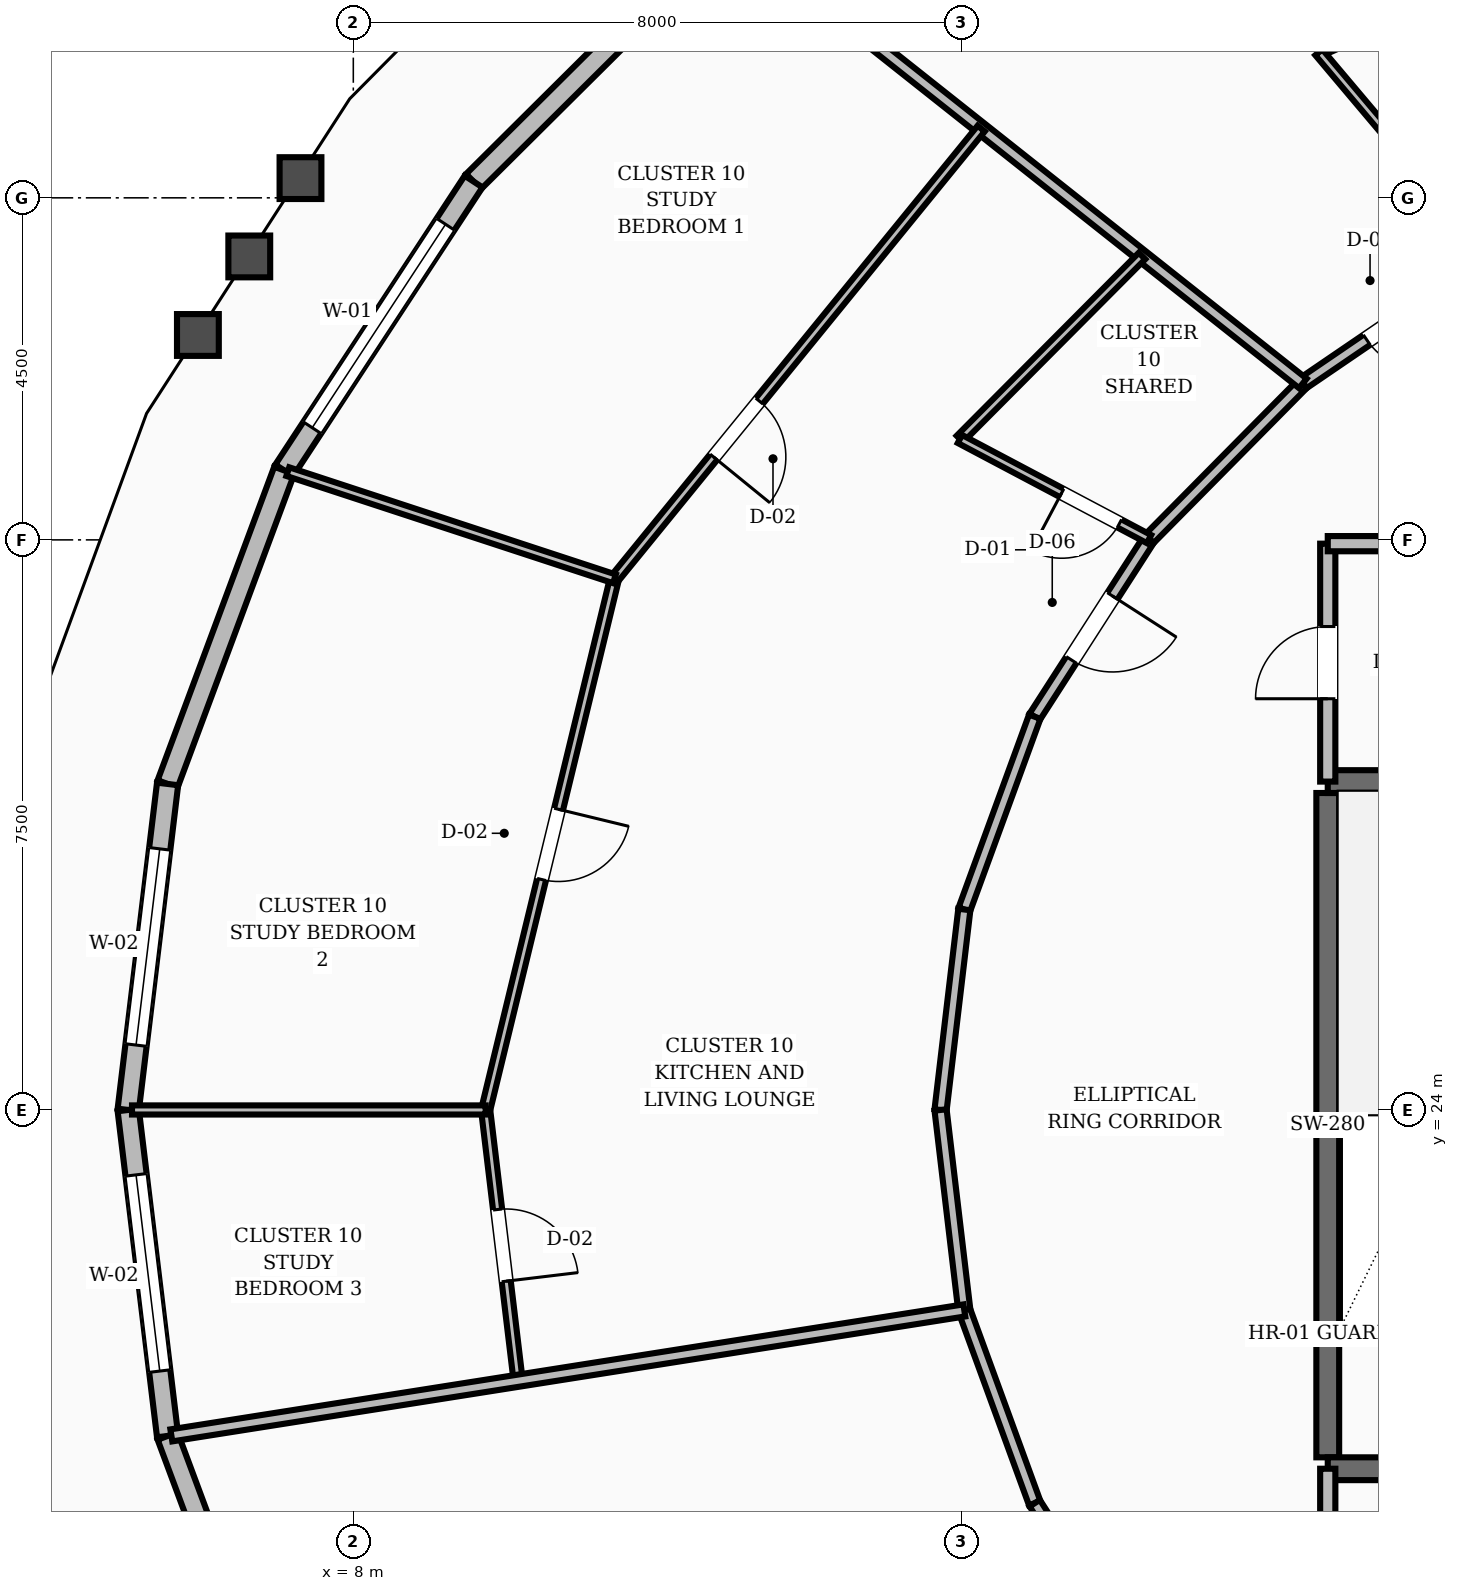
"""IFC4 building model, lengths in metres.
Left out: names, types, materials, properties, quantities, classifications, styles, units other than length and angle.
Written with IfcOpenShell. Run it as: python <this file> out.ifc"""

import sys

from ifc_helpers import new_model, si_unit, direction, frame, frame_2d, origin, place, context, subcontext, project, spatial, rectangle, extrude, element, fill, save


model = new_model("IFC4")
c1 = context("Model", 3, precision=1e-05, world=origin(), true_north=direction((0.0, 1.0)))
c2 = subcontext(c1, "Body", "Model", "MODEL_VIEW")
j1 = project(units=[si_unit("LENGTHUNIT", "METRE"), si_unit("PLANEANGLEUNIT", "RADIAN")], contexts=[c1])
p1 = place(None, origin())
s1 = spatial("IfcSite", under=j1, at=p1, CompositionType="ELEMENT")
p2 = place(p1, origin())
s2 = spatial("IfcBuilding", under=s1, at=p2, CompositionType="ELEMENT")
p3 = place(p2, frame((0.0, 0.0, 91.6)))
s3 = spatial("IfcBuildingStorey", under=s2, at=p3, CompositionType="ELEMENT", Elevation=91.6)
p4 = place(p3, frame((20.82, 19.43, 0.0), z_axis=(0.0, 0.0, 1.0), x_axis=(0.0, 1.0, 0.0)))
e1 = element("IfcWall", 1, at=p4, inside=s3, PredefinedType="SHEAR", context=c2, shape_type="SweptSolid", body=[
    extrude(rectangle(XDim=8.74, YDim=0.3, at=frame_2d((4.37, 0.0))), origin(), (0.0, 0.0, 1.0), 3.6),
])
p5 = place(p3, frame((20.82, 19.28, 0.0), z_axis=(0.0, 0.0, 1.0), x_axis=(1.0, 0.0, 0.0)))
e2 = element("IfcWall", 2, at=p5, inside=s3, PredefinedType="SHEAR", context=c2, shape_type="SweptSolid", body=[
    extrude(rectangle(XDim=3.6, YDim=0.3, at=frame_2d((1.8, 0.0))), origin(), (0.0, 0.0, 1.0), 3.6),
])
p6 = place(p5, frame((1.3, 0.0, 0.0)))
e3 = element("IfcOpeningElement", 3, at=p6, cuts=e2, PredefinedType="OPENING", context=c2, shape_type="SweptSolid", body=[
    extrude(rectangle(XDim=1.1, YDim=2.1, at=frame_2d((0.55, 1.05))), frame((0.0, 0.16, 0.0), z_axis=(0.0, -1.0, 0.0), x_axis=(1.0, 0.0, 0.0)), (0.0, 0.0, 1.0), 0.32),
])
p7 = place(p3, frame((20.82, 28.32, 0.0), z_axis=(0.0, 0.0, 1.0), x_axis=(1.0, 0.0, 0.0)))
e4 = element("IfcWall", 4, at=p7, inside=s3, PredefinedType="SHEAR", context=c2, shape_type="SweptSolid", body=[
    extrude(rectangle(XDim=3.6, YDim=0.3, at=frame_2d((1.8, 0.0))), origin(), (0.0, 0.0, 1.0), 3.6),
])
p8 = place(p3, frame((12.935, 39.546, 0.0), z_axis=(0.0, 0.0, 1.0), x_axis=(-0.709375776042, -0.704830482006, 0.0)))
e5 = element("IfcWall", 5, at=p8, inside=s3, PredefinedType="STANDARD", context=c2, shape_type="SweptSolid", body=[
    extrude(rectangle(XDim=4.727, YDim=0.28, at=frame_2d((2.363, 0.0))), origin(), (0.0, 0.0, 1.0), 2.71),
])
p9 = place(p3, frame((9.582, 36.214, 0.0), z_axis=(0.0, 0.0, 1.0), x_axis=(-0.548224545432, -0.836331183076, 0.0)))
e6 = element("IfcWall", 6, at=p9, inside=s3, PredefinedType="STANDARD", context=c2, shape_type="SweptSolid", body=[
    extrude(rectangle(XDim=4.545, YDim=0.28, at=frame_2d((2.272, 0.0))), origin(), (0.0, 0.0, 1.0), 2.71),
])
p10 = place(p9, frame((0.672, 0.0, 0.8)))
e7 = element("IfcOpeningElement", 7, at=p10, cuts=e6, PredefinedType="OPENING", context=c2, shape_type="SweptSolid", body=[
    extrude(rectangle(XDim=3.2, YDim=1.65, at=frame_2d((1.6, 0.825))), frame((0.0, 0.15, 0.0), z_axis=(0.0, -1.0, 0.0), x_axis=(1.0, 0.0, 0.0)), (0.0, 0.0, 1.0), 0.3),
])
p11 = place(p3, frame((7.091, 32.413, 0.0), z_axis=(0.0, 0.0, 1.0), x_axis=(-0.348647575397, -0.937253897388, 0.0)))
e8 = element("IfcWall", 8, at=p11, inside=s3, PredefinedType="STANDARD", context=c2, shape_type="SweptSolid", body=[
    extrude(rectangle(XDim=4.4, YDim=0.28, at=frame_2d((2.2, 0.0))), origin(), (0.0, 0.0, 1.0), 2.71),
])
p12 = place(p3, frame((5.557, 28.289, 0.0), z_axis=(0.0, 0.0, 1.0), x_axis=(-0.11991619344, -0.992784018078, 0.0)))
e9 = element("IfcWall", 9, at=p12, inside=s3, PredefinedType="STANDARD", context=c2, shape_type="SweptSolid", body=[
    extrude(rectangle(XDim=4.32, YDim=0.28, at=frame_2d((2.16, 0.0))), origin(), (0.0, 0.0, 1.0), 2.71),
])
p13 = place(p12, frame((0.86, 0.0, 0.8)))
e10 = element("IfcOpeningElement", 10, at=p13, cuts=e9, PredefinedType="OPENING", context=c2, shape_type="SweptSolid", body=[
    extrude(rectangle(XDim=2.6, YDim=1.65, at=frame_2d((1.3, 0.825))), frame((0.0, 0.15, 0.0), z_axis=(0.0, -1.0, 0.0), x_axis=(1.0, 0.0, 0.0)), (0.0, 0.0, 1.0), 0.3),
])
p14 = place(p3, frame((5.039, 24.0, 0.0), z_axis=(0.0, 0.0, 1.0), x_axis=(0.11991619344, -0.992784018078, 0.0)))
e11 = element("IfcWall", 11, at=p14, inside=s3, PredefinedType="STANDARD", context=c2, shape_type="SweptSolid", body=[
    extrude(rectangle(XDim=4.32, YDim=0.28, at=frame_2d((2.16, 0.0))), origin(), (0.0, 0.0, 1.0), 2.71),
])
p15 = place(p14, frame((0.86, 0.0, 0.8)))
e12 = element("IfcOpeningElement", 12, at=p15, cuts=e11, PredefinedType="OPENING", context=c2, shape_type="SweptSolid", body=[
    extrude(rectangle(XDim=2.6, YDim=1.65, at=frame_2d((1.3, 0.825))), frame((0.0, 0.15, 0.0), z_axis=(0.0, -1.0, 0.0), x_axis=(1.0, 0.0, 0.0)), (0.0, 0.0, 1.0), 0.3),
])
p16 = place(p3, frame((5.557, 19.711, 0.0), z_axis=(0.0, 0.0, 1.0), x_axis=(0.348647575397, -0.937253897388, 0.0)))
e13 = element("IfcWall", 13, at=p16, inside=s3, PredefinedType="STANDARD", context=c2, shape_type="SweptSolid", body=[
    extrude(rectangle(XDim=4.4, YDim=0.28, at=frame_2d((2.2, 0.0))), origin(), (0.0, 0.0, 1.0), 2.71),
])
p17 = place(p3, frame((20.82, 16.55, 0.0), z_axis=(0.0, 0.0, 1.0), x_axis=(0.0, 1.0, 0.0)))
e14 = element("IfcWall", 14, at=p17, inside=s3, PredefinedType="SOLIDWALL", context=c2, shape_type="SweptSolid", body=[
    extrude(rectangle(XDim=2.73, YDim=0.2, at=frame_2d((1.365, 0.0))), origin(), (0.0, 0.0, 1.0), 2.71),
])
p18 = place(p17, frame((0.815, 0.0, 0.0)))
e15 = element("IfcOpeningElement", 15, at=p18, cuts=e14, PredefinedType="OPENING", context=c2, shape_type="SweptSolid", body=[
    extrude(rectangle(XDim=1.1, YDim=2.1, at=frame_2d((0.55, 1.05))), frame((0.0, 0.11, 0.0), z_axis=(0.0, -1.0, 0.0), x_axis=(1.0, 0.0, 0.0)), (0.0, 0.0, 1.0), 0.22),
])
p19 = place(p3, frame((20.82, 28.32, 0.0), z_axis=(0.0, 0.0, 1.0), x_axis=(0.0, 1.0, 0.0)))
e16 = element("IfcWall", 16, at=p19, inside=s3, PredefinedType="SOLIDWALL", context=c2, shape_type="SweptSolid", body=[
    extrude(rectangle(XDim=3.13, YDim=0.2, at=frame_2d((1.565, 0.0))), origin(), (0.0, 0.0, 1.0), 2.71),
])
p20 = place(p19, frame((1.09, 0.0, 0.0)))
e17 = element("IfcOpeningElement", 17, at=p20, cuts=e16, PredefinedType="OPENING", context=c2, shape_type="SweptSolid", body=[
    extrude(rectangle(XDim=0.95, YDim=2.1, at=frame_2d((0.475, 1.05))), frame((0.0, 0.11, 0.0), z_axis=(0.0, -1.0, 0.0), x_axis=(1.0, 0.0, 0.0)), (0.0, 0.0, 1.0), 0.22),
])
p21 = place(p3, frame((20.82, 31.45, 0.0), z_axis=(0.0, 0.0, 1.0), x_axis=(1.0, 0.0, 0.0)))
e18 = element("IfcWall", 18, at=p21, inside=s3, PredefinedType="SOLIDWALL", context=c2, shape_type="SweptSolid", body=[
    extrude(rectangle(XDim=3.98, YDim=0.2, at=frame_2d((1.99, 0.0))), origin(), (0.0, 0.0, 1.0), 2.71),
])
p22 = place(p3, frame((22.959, 35.24, 0.0), z_axis=(0.0, 0.0, 1.0), x_axis=(-0.826293096206, -0.56324037423, 0.0)))
e19 = element("IfcWall", 19, at=p22, inside=s3, PredefinedType="SOLIDWALL", context=c2, shape_type="SweptSolid", body=[
    extrude(rectangle(XDim=2.985, YDim=0.16, at=frame_2d((1.492, 0.0))), origin(), (0.0, 0.0, 1.0), 2.71),
])
p23 = place(p22, frame((1.017, 0.0, 0.0)))
e20 = element("IfcOpeningElement", 20, at=p23, cuts=e19, PredefinedType="OPENING", context=c2, shape_type="SweptSolid", body=[
    extrude(rectangle(XDim=0.95, YDim=2.1, at=frame_2d((0.475, 1.05))), frame((0.0, 0.09, 0.0), z_axis=(0.0, -1.0, 0.0), x_axis=(1.0, 0.0, 0.0)), (0.0, 0.0, 1.0), 0.18),
])
p24 = place(p3, frame((20.492, 33.559, 0.0), z_axis=(0.0, 0.0, 1.0), x_axis=(-0.702811997, -0.711375636969, 0.0)))
e21 = element("IfcWall", 21, at=p24, inside=s3, PredefinedType="SOLIDWALL", context=c2, shape_type="SweptSolid", body=[
    extrude(rectangle(XDim=2.879, YDim=0.16, at=frame_2d((1.44, 0.0))), origin(), (0.0, 0.0, 1.0), 2.71),
])
p25 = place(p3, frame((18.469, 31.51, 0.0), z_axis=(0.0, 0.0, 1.0), x_axis=(-0.541126045017, -0.840941498206, 0.0)))
e22 = element("IfcWall", 22, at=p25, inside=s3, PredefinedType="SOLIDWALL", context=c2, shape_type="SweptSolid", body=[
    extrude(rectangle(XDim=2.779, YDim=0.16, at=frame_2d((1.39, 0.0))), origin(), (0.0, 0.0, 1.0), 2.71),
])
p26 = place(p25, frame((0.89, 0.0, 0.0)))
e23 = element("IfcOpeningElement", 23, at=p26, cuts=e22, PredefinedType="OPENING", context=c2, shape_type="SweptSolid", body=[
    extrude(rectangle(XDim=1.0, YDim=2.1, at=frame_2d((0.5, 1.05))), frame((0.0, 0.09, 0.0), z_axis=(0.0, -1.0, 0.0), x_axis=(1.0, 0.0, 0.0)), (0.0, 0.0, 1.0), 0.18),
])
p27 = place(p3, frame((16.965, 29.173, 0.0), z_axis=(0.0, 0.0, 1.0), x_axis=(-0.343013437329, -0.939330496583, 0.0)))
e24 = element("IfcWall", 24, at=p27, inside=s3, PredefinedType="SOLIDWALL", context=c2, shape_type="SweptSolid", body=[
    extrude(rectangle(XDim=2.7, YDim=0.16, at=frame_2d((1.35, 0.0))), origin(), (0.0, 0.0, 1.0), 2.71),
])
for number, where, z_axis, x_axis in (
    (25, (16.039, 26.637, 0.0), (0.0, 0.0, 1.0), (-0.118, -0.993, 0.0)),
    (26, (15.726, 24.0, 0.0), (0.0, 0.0, 1.0), (0.118, -0.993, 0.0)),
):
    element("IfcWall", number, at=place(p3, frame(where, z_axis=z_axis, x_axis=x_axis)), inside=s3, PredefinedType="SOLIDWALL", context=c2, shape_type="SweptSolid", body=[
        extrude(rectangle(XDim=2.656, YDim=0.16, at=frame_2d((1.328, 0.0))), origin(), (0.0, 0.0, 1.0), 2.71),
    ])
p28 = place(p3, frame((16.039, 21.363, 0.0), z_axis=(0.0, 0.0, 1.0), x_axis=(0.343013437329, -0.939330496583, 0.0)))
e27 = element("IfcWall", 27, at=p28, inside=s3, PredefinedType="SOLIDWALL", context=c2, shape_type="SweptSolid", body=[
    extrude(rectangle(XDim=2.7, YDim=0.16, at=frame_2d((1.35, 0.0))), origin(), (0.0, 0.0, 1.0), 2.71),
])
p29 = place(p3, frame((16.965, 18.827, 0.0), z_axis=(0.0, 0.0, 1.0), x_axis=(0.541126045017, -0.840941498206, 0.0)))
e28 = element("IfcWall", 28, at=p29, inside=s3, PredefinedType="SOLIDWALL", context=c2, shape_type="SweptSolid", body=[
    extrude(rectangle(XDim=2.779, YDim=0.16, at=frame_2d((1.39, 0.0))), origin(), (0.0, 0.0, 1.0), 2.71),
])
p30 = place(p29, frame((0.89, 0.0, 0.0)))
e29 = element("IfcOpeningElement", 29, at=p30, cuts=e28, PredefinedType="OPENING", context=c2, shape_type="SweptSolid", body=[
    extrude(rectangle(XDim=1.0, YDim=2.1, at=frame_2d((0.5, 1.05))), frame((0.0, 0.09, 0.0), z_axis=(0.0, -1.0, 0.0), x_axis=(1.0, 0.0, 0.0)), (0.0, 0.0, 1.0), 0.18),
])
p31 = place(p3, frame((24.218, 39.462, 0.0), z_axis=(0.0, 0.0, 1.0), x_axis=(-0.915338463075, -0.402685358582, 0.0)))
e30 = element("IfcWall", 30, at=p31, inside=s3, PredefinedType="PARTITIONING", context=c2, shape_type="SweptSolid", body=[
    extrude(rectangle(XDim=3.841, YDim=0.12, at=frame_2d((1.92, 0.0))), origin(), (0.0, 0.0, 1.0), 2.71),
])
p32 = place(p31, frame((1.49, 0.0, 0.0)))
e31 = element("IfcOpeningElement", 31, at=p32, cuts=e30, PredefinedType="OPENING", context=c2, shape_type="SweptSolid", body=[
    extrude(rectangle(XDim=0.86, YDim=2.1, at=frame_2d((0.43, 1.05))), frame((0.0, 0.07, 0.0), z_axis=(0.0, -1.0, 0.0), x_axis=(1.0, 0.0, 0.0)), (0.0, 0.0, 1.0), 0.14),
])
p33 = place(p3, frame((22.959, 35.24, 0.0), z_axis=(0.0, 0.0, 1.0), x_axis=(-0.644715569152, 0.764422549964, 0.0)))
e32 = element("IfcWall", 32, at=p33, inside=s3, PredefinedType="PARTITIONING", context=c2, shape_type="SweptSolid", body=[
    extrude(rectangle(XDim=3.5, YDim=0.12, at=frame_2d((1.75, 0.0))), origin(), (0.0, 0.0, 1.0), 2.71),
])
p34 = place(p3, frame((20.492, 33.559, 0.0), z_axis=(0.0, 0.0, 1.0), x_axis=(-0.783820213827, 0.620987819846, 0.0)))
e33 = element("IfcWall", 33, at=p34, inside=s3, PredefinedType="SOLIDWALL", context=c2, shape_type="SweptSolid", body=[
    extrude(rectangle(XDim=9.591, YDim=0.16, at=frame_2d((4.796, 0.0))), origin(), (0.0, 0.0, 1.0), 2.71),
])
p35 = place(p3, frame((18.376, 35.235, 0.0), z_axis=(0.0, 0.0, 1.0), x_axis=(-0.705379680945, -0.708829673271, 0.0)))
e34 = element("IfcWall", 34, at=p35, inside=s3, PredefinedType="PARTITIONING", context=c2, shape_type="SweptSolid", body=[
    extrude(rectangle(XDim=3.397, YDim=0.12, at=frame_2d((1.698, 0.0))), origin(), (0.0, 0.0, 1.0), 2.71),
])
p36 = place(p3, frame((18.469, 31.51, 0.0), z_axis=(0.0, 0.0, 1.0), x_axis=(-0.883815336017, 0.467835924039, 0.0)))
e35 = element("IfcWall", 35, at=p36, inside=s3, PredefinedType="PARTITIONING", context=c2, shape_type="SweptSolid", body=[
    extrude(rectangle(XDim=2.815, YDim=0.12, at=frame_2d((1.408, 0.0))), origin(), (0.0, 0.0, 1.0), 2.71),
])
p37 = place(p36, frame((0.44, 0.0, 0.0)))
e36 = element("IfcOpeningElement", 36, at=p37, cuts=e35, PredefinedType="OPENING", context=c2, shape_type="SweptSolid", body=[
    extrude(rectangle(XDim=0.86, YDim=2.1, at=frame_2d((0.43, 1.05))), frame((0.0, 0.07, 0.0), z_axis=(0.0, -1.0, 0.0), x_axis=(1.0, 0.0, 0.0)), (0.0, 0.0, 1.0), 0.14),
])
p38 = place(p3, frame((16.26, 36.911, 0.0), z_axis=(0.0, 0.0, 1.0), x_axis=(-0.631544914576, -0.775339294034, 0.0)))
e37 = element("IfcWall", 37, at=p38, inside=s3, PredefinedType="PARTITIONING", context=c2, shape_type="SweptSolid", body=[
    extrude(rectangle(XDim=7.64, YDim=0.12, at=frame_2d((3.82, 0.0))), origin(), (0.0, 0.0, 1.0), 2.71),
])
p39 = place(p38, frame((4.623, 0.0, 0.0)))
e38 = element("IfcOpeningElement", 38, at=p39, cuts=e37, PredefinedType="OPENING", context=c2, shape_type="SweptSolid", body=[
    extrude(rectangle(XDim=0.95, YDim=2.1, at=frame_2d((0.475, 1.05))), frame((0.0, 0.07, 0.0), z_axis=(0.0, -1.0, 0.0), x_axis=(1.0, 0.0, 0.0)), (0.0, 0.0, 1.0), 0.14),
])
p40 = place(p3, frame((11.435, 30.988, 0.0), z_axis=(0.0, 0.0, 1.0), x_axis=(-0.235650560851, -0.971837853333, 0.0)))
e39 = element("IfcWall", 39, at=p40, inside=s3, PredefinedType="PARTITIONING", context=c2, shape_type="SweptSolid", body=[
    extrude(rectangle(XDim=7.19, YDim=0.12, at=frame_2d((3.595, 0.0))), origin(), (0.0, 0.0, 1.0), 2.71),
])
p41 = place(p40, frame((3.12, 0.0, 0.0)))
e40 = element("IfcOpeningElement", 40, at=p41, cuts=e39, PredefinedType="OPENING", context=c2, shape_type="SweptSolid", body=[
    extrude(rectangle(XDim=0.95, YDim=2.1, at=frame_2d((0.475, 1.05))), frame((0.0, 0.07, 0.0), z_axis=(0.0, -1.0, 0.0), x_axis=(1.0, 0.0, 0.0)), (0.0, 0.0, 1.0), 0.14),
])
p42 = place(p3, frame((11.435, 30.988, 0.0), z_axis=(0.0, 0.0, 1.0), x_axis=(-0.950146719348, 0.311803161806, 0.0)))
e41 = element("IfcWall", 41, at=p42, inside=s3, PredefinedType="PARTITIONING", context=c2, shape_type="SweptSolid", body=[
    extrude(rectangle(XDim=4.523, YDim=0.12, at=frame_2d((2.261, 0.0))), origin(), (0.0, 0.0, 1.0), 2.71),
])
p43 = place(p3, frame((9.741, 24.0, 0.0), z_axis=(0.0, 0.0, 1.0), x_axis=(0.119217667406, -0.992868142191, 0.0)))
e42 = element("IfcWall", 42, at=p43, inside=s3, PredefinedType="PARTITIONING", context=c2, shape_type="SweptSolid", body=[
    extrude(rectangle(XDim=3.588, YDim=0.12, at=frame_2d((1.794, 0.0))), origin(), (0.0, 0.0, 1.0), 2.71),
])
p44 = place(p43, frame((1.319, 0.0, 0.0)))
e43 = element("IfcOpeningElement", 43, at=p44, cuts=e42, PredefinedType="OPENING", context=c2, shape_type="SweptSolid", body=[
    extrude(rectangle(XDim=0.95, YDim=2.1, at=frame_2d((0.475, 1.05))), frame((0.0, 0.07, 0.0), z_axis=(0.0, -1.0, 0.0), x_axis=(1.0, 0.0, 0.0)), (0.0, 0.0, 1.0), 0.14),
])
p45 = place(p3, frame((9.741, 24.0, 0.0), z_axis=(0.0, 0.0, 1.0), x_axis=(-1.0, 0.0, 0.0)))
e44 = element("IfcWall", 44, at=p45, inside=s3, PredefinedType="PARTITIONING", context=c2, shape_type="SweptSolid", body=[
    extrude(rectangle(XDim=4.653, YDim=0.12, at=frame_2d((2.326, 0.0))), origin(), (0.0, 0.0, 1.0), 2.71),
])
p46 = place(p3, frame((16.039, 21.363, 0.0), z_axis=(0.0, 0.0, 1.0), x_axis=(-0.987810338439, -0.155662247421, 0.0)))
e45 = element("IfcWall", 45, at=p46, inside=s3, PredefinedType="SOLIDWALL", context=c2, shape_type="SweptSolid", body=[
    extrude(rectangle(XDim=10.562, YDim=0.16, at=frame_2d((5.281, 0.0))), origin(), (0.0, 0.0, 1.0), 2.71),
])
p47 = place(p10, origin())
e46 = element("IfcWindow", 46, at=p47, inside=s3, PartitioningType="SINGLE_PANEL", PredefinedType="WINDOW", context=c2, shape_type="SweptSolid", body=[
    extrude(rectangle(XDim=3.2, YDim=1.65, at=frame_2d((1.6, 0.825))), frame((0.0, 0.03, 0.0), z_axis=(0.0, -1.0, 0.0), x_axis=(1.0, 0.0, 0.0)), (0.0, 0.0, 1.0), 0.06),
])
fill(e7, e46)
p48 = place(p13, origin())
e47 = element("IfcWindow", 47, at=p48, inside=s3, PartitioningType="SINGLE_PANEL", PredefinedType="WINDOW", context=c2, shape_type="SweptSolid", body=[
    extrude(rectangle(XDim=2.6, YDim=1.65, at=frame_2d((1.3, 0.825))), frame((0.0, 0.03, 0.0), z_axis=(0.0, -1.0, 0.0), x_axis=(1.0, 0.0, 0.0)), (0.0, 0.0, 1.0), 0.06),
])
fill(e10, e47)
p49 = place(p15, origin())
e48 = element("IfcWindow", 48, at=p49, inside=s3, PartitioningType="SINGLE_PANEL", PredefinedType="WINDOW", context=c2, shape_type="SweptSolid", body=[
    extrude(rectangle(XDim=2.6, YDim=1.65, at=frame_2d((1.3, 0.825))), frame((0.0, 0.03, 0.0), z_axis=(0.0, -1.0, 0.0), x_axis=(1.0, 0.0, 0.0)), (0.0, 0.0, 1.0), 0.06),
])
fill(e12, e48)
p50 = place(p20, origin())
e49 = element("IfcDoor", 49, at=p50, inside=s3, OperationType="SINGLE_SWING_LEFT", PredefinedType="DOOR", context=c2, shape_type="SweptSolid", body=[
    extrude(rectangle(XDim=0.95, YDim=2.1, at=frame_2d((0.475, 1.05))), frame((0.0, 0.025, 0.0), z_axis=(0.0, -1.0, 0.0), x_axis=(1.0, 0.0, 0.0)), (0.0, 0.0, 1.0), 0.05),
])
fill(e17, e49)
p51 = place(p23, origin())
e50 = element("IfcDoor", 50, at=p51, inside=s3, OperationType="SINGLE_SWING_LEFT", PredefinedType="DOOR", context=c2, shape_type="SweptSolid", body=[
    extrude(rectangle(XDim=0.95, YDim=2.1, at=frame_2d((0.475, 1.05))), frame((0.0, 0.025, 0.0), z_axis=(0.0, -1.0, 0.0), x_axis=(1.0, 0.0, 0.0)), (0.0, 0.0, 1.0), 0.05),
])
fill(e20, e50)
p52 = place(p37, origin())
e51 = element("IfcDoor", 51, at=p52, inside=s3, OperationType="SINGLE_SWING_RIGHT", PredefinedType="DOOR", context=c2, shape_type="SweptSolid", body=[
    extrude(rectangle(XDim=0.86, YDim=2.1, at=frame_2d((0.43, 1.05))), frame((0.0, 0.025, 0.0), z_axis=(0.0, -1.0, 0.0), x_axis=(1.0, 0.0, 0.0)), (0.0, 0.0, 1.0), 0.05),
])
fill(e36, e51)
p53 = place(p26, origin())
e52 = element("IfcDoor", 52, at=p53, inside=s3, OperationType="SINGLE_SWING_LEFT", PredefinedType="DOOR", context=c2, shape_type="SweptSolid", body=[
    extrude(rectangle(XDim=1.0, YDim=2.1, at=frame_2d((0.5, 1.05))), frame((0.0, 0.025, 0.0), z_axis=(0.0, -1.0, 0.0), x_axis=(1.0, 0.0, 0.0)), (0.0, 0.0, 1.0), 0.05),
])
fill(e23, e52)
p54 = place(p39, origin())
e53 = element("IfcDoor", 53, at=p54, inside=s3, OperationType="SINGLE_SWING_RIGHT", PredefinedType="DOOR", context=c2, shape_type="SweptSolid", body=[
    extrude(rectangle(XDim=0.95, YDim=2.1, at=frame_2d((0.475, 1.05))), frame((0.0, 0.025, 0.0), z_axis=(0.0, -1.0, 0.0), x_axis=(1.0, 0.0, 0.0)), (0.0, 0.0, 1.0), 0.05),
])
fill(e38, e53)
p55 = place(p41, origin())
e54 = element("IfcDoor", 54, at=p55, inside=s3, OperationType="SINGLE_SWING_LEFT", PredefinedType="DOOR", context=c2, shape_type="SweptSolid", body=[
    extrude(rectangle(XDim=0.95, YDim=2.1, at=frame_2d((0.475, 1.05))), frame((0.0, 0.025, 0.0), z_axis=(0.0, -1.0, 0.0), x_axis=(1.0, 0.0, 0.0)), (0.0, 0.0, 1.0), 0.05),
])
fill(e40, e54)
p56 = place(p44, origin())
e55 = element("IfcDoor", 55, at=p56, inside=s3, OperationType="SINGLE_SWING_RIGHT", PredefinedType="DOOR", context=c2, shape_type="SweptSolid", body=[
    extrude(rectangle(XDim=0.95, YDim=2.1, at=frame_2d((0.475, 1.05))), frame((0.0, 0.025, 0.0), z_axis=(0.0, -1.0, 0.0), x_axis=(1.0, 0.0, 0.0)), (0.0, 0.0, 1.0), 0.05),
])
fill(e43, e55)
save(model, sys.argv[1])
